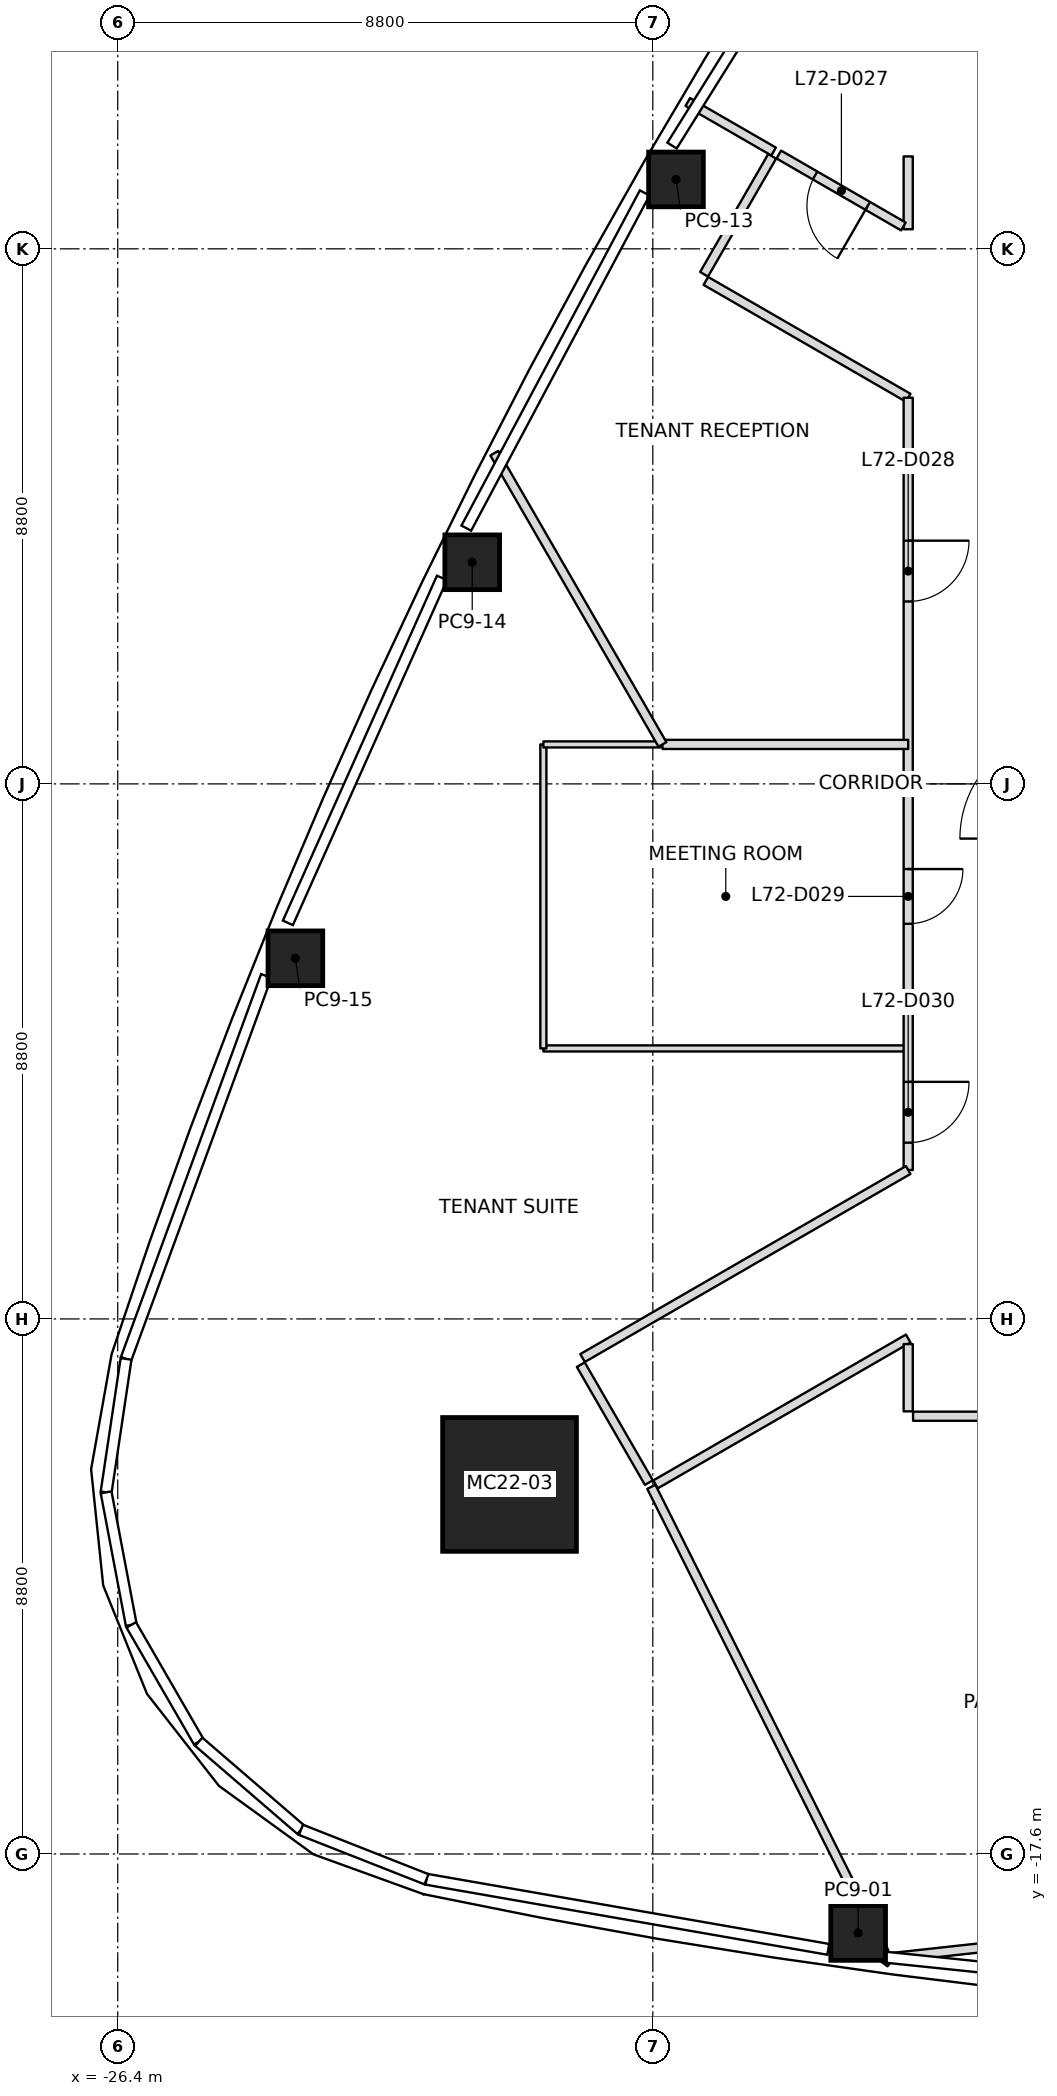
"""IFC4 building model, lengths in metres.
Left out: names, types, materials, properties, quantities, classifications, styles, units other than length and angle.
Written with IfcOpenShell. Run it as: python <this file> out.ifc"""

import sys

from ifc_helpers import new_model, si_unit, direction, frame, frame_2d, origin, origin_2d, place, context, subcontext, project, spatial, rectangle, extrude, clip, halfspace, element, fill, save


model = new_model("IFC4")
c1 = context("Model", 3, precision=1e-05, world=origin(), true_north=direction((0.0, 1.0)))
c2 = subcontext(c1, "Body", "Model", "MODEL_VIEW")
j1 = project(units=[si_unit("LENGTHUNIT", "METRE"), si_unit("PLANEANGLEUNIT", "RADIAN")], contexts=[c1])
p1 = place(None, origin())
s1 = spatial("IfcSite", under=j1, at=p1, CompositionType="ELEMENT")
p2 = place(p1, origin())
s2 = spatial("IfcBuilding", under=s1, at=p2, CompositionType="ELEMENT")
p3 = place(p2, frame((0.0, 0.0, 315.0)))
s3 = spatial("IfcBuildingStorey", under=s2, at=p3, CompositionType="ELEMENT", Elevation=315.0)
p4 = place(p3, frame((-19.957, -11.522, 0.0), z_axis=(0.027695790401, 0.015983033227, 0.999488612163), x_axis=(0.999616398022, -0.00044283261, -0.027692249912)))
e1 = element("IfcColumn", 1, at=p4, inside=s3, PredefinedType="COLUMN", context=c2, shape_type="SweptSolid", body=[
    clip(extrude(rectangle(XDim=2.2, YDim=2.2, at=origin_2d()), origin(), (0.0, 0.0, 1.0), 4.002), halfspace(frame((0.0, 0.0, 3.996)), False)),
])
p5 = place(p3, frame((-14.223, -18.899, 0.0), z_axis=(0.017391463473, 0.010312832726, 0.999795570344), x_axis=(-0.990322442734, 0.13788284729, 0.015804424743)))
e2 = element("IfcColumn", 2, at=p5, inside=s3, PredefinedType="COLUMN", context=c2, shape_type="SweptSolid", body=[
    clip(extrude(rectangle(XDim=0.9, YDim=0.9, at=origin_2d()), origin(), (0.0, 0.0, 1.0), 4.001), halfspace(frame((0.0, 0.0, 3.999)), False)),
])
p6 = place(p3, frame((-17.219, 9.941, 0.0), z_axis=(0.009887052741, -0.005675900648, 0.999935013058), x_axis=(0.49997556095, 0.866039512773, -2.7732311e-05)))
e3 = element("IfcColumn", 3, at=p6, inside=s3, PredefinedType="COLUMN", context=c2, shape_type="SweptSolid", body=[
    clip(extrude(rectangle(XDim=0.9, YDim=0.9, at=origin_2d()), origin(), (0.0, 0.0, 1.0), 4.0), halfspace(frame((0.0, 0.0, 3.999)), False)),
])
p7 = place(p3, frame((-20.57, 3.645, 0.0), z_axis=(0.014036676147, 0.001952928855, 0.999899573853), x_axis=(0.438991330539, 0.898456413276, -0.007917395706)))
e4 = element("IfcColumn", 4, at=p7, inside=s3, PredefinedType="COLUMN", context=c2, shape_type="SweptSolid", body=[
    clip(extrude(rectangle(XDim=0.9, YDim=0.9, at=origin_2d()), origin(), (0.0, 0.0, 1.0), 4.0), halfspace(frame((0.0, 0.0, 3.999)), False)),
])
p8 = place(p3, frame((-23.479, -2.868, 0.0), z_axis=(0.017696558482, 0.009885663704, 0.999794531627), x_axis=(0.375914723165, 0.926519298073, -0.015814904541)))
e5 = element("IfcColumn", 5, at=p8, inside=s3, PredefinedType="COLUMN", context=c2, shape_type="SweptSolid", body=[
    clip(extrude(rectangle(XDim=0.9, YDim=0.9, at=origin_2d()), origin(), (0.0, 0.0, 1.0), 4.001), halfspace(frame((0.0, 0.0, 3.999)), False)),
])
p9 = place(p3, frame((-13.4, 0.649, 0.0), z_axis=(0.0, 0.0, 1.0), x_axis=(-1.0, 0.0, 0.0)))
e6 = element("IfcWall", 6, at=p9, inside=s3, PredefinedType="PARTITIONING", context=c2, shape_type="SweptSolid", body=[
    extrude(rectangle(XDim=4.042, YDim=0.15, at=frame_2d((2.021, 0.0))), origin(), (0.0, 0.0, 1.0), 3.45),
])
p10 = place(p3, frame((-17.441, 0.649, 0.0), z_axis=(0.0, 0.0, 1.0), x_axis=(-0.499998843543, 0.866026071464, 0.0)))
e7 = element("IfcWall", 7, at=p10, inside=s3, PredefinedType="PARTITIONING", context=c2, shape_type="SweptSolid", body=[
    extrude(rectangle(XDim=5.531, YDim=0.15, at=frame_2d((2.765, 0.0))), origin(), (0.0, 0.0, 1.0), 3.234),
])
p11 = place(p3, frame((-17.625, -11.561, 0.0), z_axis=(0.0, 0.0, 1.0), x_axis=(0.447464657965, -0.894301615716, 0.0)))
e8 = element("IfcWall", 8, at=p11, inside=s3, PredefinedType="PARTITIONING", context=c2, shape_type="SweptSolid", body=[
    extrude(rectangle(XDim=8.557, YDim=0.15, at=frame_2d((4.278, 0.0))), origin(), (0.0, 0.0, 1.0), 3.45),
])
p12 = place(p3, frame((-15.613, 10.4, 0.0), z_axis=(0.0, 0.0, 1.0), x_axis=(-0.865976063253, 0.500085450571, 0.0)))
e9 = element("IfcWall", 9, at=p12, inside=s3, PredefinedType="PARTITIONING", context=c2, shape_type="SweptSolid", body=[
    extrude(rectangle(XDim=1.63, YDim=0.15, at=frame_2d((0.815, 0.0))), origin(), (0.0, 0.0, 1.0), 3.234),
])
p13 = place(p3, frame((-8.2, -18.703, 0.0), z_axis=(0.0, 0.0, 1.0), x_axis=(-0.994036039738, -0.109052059594, 0.0)))
e10 = element("IfcWall", 10, at=p13, inside=s3, PredefinedType="PARTITIONING", context=c2, shape_type="SweptSolid", body=[
    extrude(rectangle(XDim=5.478, YDim=0.15, at=frame_2d((2.739, 0.0))), origin(), (0.0, 0.0, 1.0), 3.234),
])
p14 = place(p3, frame((-13.696, -19.387, 0.0), z_axis=(0.0, 0.0, 1.0), x_axis=(-0.806193122495, 0.591652473368, 0.0)))
e11 = element("IfcWall", 11, at=p14, inside=s3, PredefinedType="PARTITIONING", context=c2, shape_type="SweptSolid", body=[
    extrude(rectangle(XDim=0.183, YDim=0.15, at=frame_2d((0.092, 0.0))), origin(), (0.0, 0.0, 1.0), 3.45),
])
p15 = place(p3, frame((-18.784, -9.552, 0.0), z_axis=(0.0, 0.0, 1.0), x_axis=(0.49994888933, -0.866054910533, 0.0)))
e12 = element("IfcWall", 12, at=p15, inside=s3, PredefinedType="PARTITIONING", context=c2, shape_type="SweptSolid", body=[
    extrude(rectangle(XDim=2.24, YDim=0.15, at=frame_2d((1.12, 0.0))), origin(), (0.0, 0.0, 1.0), 3.233),
])
p16 = place(p3, frame((-16.728, 8.272, 0.0), z_axis=(0.0, 0.0, 1.0), x_axis=(0.866021594059, -0.50000659858, 0.0)))
e13 = element("IfcWall", 13, at=p16, inside=s3, PredefinedType="PARTITIONING", context=c2, shape_type="SweptSolid", body=[
    extrude(rectangle(XDim=3.843, YDim=0.15, at=frame_2d((1.921, 0.0))), origin(), (0.0, 0.0, 1.0), 3.45),
])
p17 = place(p3, frame((-13.4, 6.351, 0.0), z_axis=(0.0, 0.0, 1.0), x_axis=(0.0, -1.0, 0.0)))
e14 = element("IfcWall", 14, at=p17, inside=s3, PredefinedType="PARTITIONING", context=c2, shape_type="SweptSolid", body=[
    extrude(rectangle(XDim=12.702, YDim=0.15, at=frame_2d((6.351, 0.0))), origin(), (0.0, 0.0, 1.0), 3.317),
])
p18 = place(p17, frame((2.351, 0.0, 0.0)))
e15 = element("IfcOpeningElement", 15, at=p18, cuts=e14, PredefinedType="OPENING", context=c2, shape_type="SweptSolid", body=[
    extrude(rectangle(XDim=1.0, YDim=2.1, at=frame_2d((0.5, 1.05))), frame((0.0, 0.075, 0.0), z_axis=(0.0, -1.0, 0.0), x_axis=(1.0, 0.0, 0.0)), (0.0, 0.0, 1.0), 0.15),
])
p19 = place(p17, frame((7.752, 0.0, 0.0)))
e16 = element("IfcOpeningElement", 16, at=p19, cuts=e14, PredefinedType="OPENING", context=c2, shape_type="SweptSolid", body=[
    extrude(rectangle(XDim=0.9, YDim=2.1, at=frame_2d((0.45, 1.05))), frame((0.0, 0.075, 0.0), z_axis=(0.0, -1.0, 0.0), x_axis=(1.0, 0.0, 0.0)), (0.0, 0.0, 1.0), 0.15),
])
p20 = place(p17, frame((11.252, 0.0, 0.0)))
e17 = element("IfcOpeningElement", 17, at=p20, cuts=e14, PredefinedType="OPENING", context=c2, shape_type="SweptSolid", body=[
    extrude(rectangle(XDim=1.0, YDim=2.1, at=frame_2d((0.5, 1.05))), frame((0.0, 0.075, 0.0), z_axis=(0.0, -1.0, 0.0), x_axis=(1.0, 0.0, 0.0)), (0.0, 0.0, 1.0), 0.15),
])
p21 = place(p3, frame((-13.4, -6.351, 0.0), z_axis=(0.0, 0.0, 1.0), x_axis=(-0.866038319186, -0.499977629202, 0.0)))
e18 = element("IfcWall", 18, at=p21, inside=s3, PredefinedType="PARTITIONING", context=c2, shape_type="SweptSolid", body=[
    extrude(rectangle(XDim=6.184, YDim=0.15, at=frame_2d((3.092, 0.0))), origin(), (0.0, 0.0, 1.0), 3.317),
])
p22 = place(p3, frame((-17.555, -11.521, 0.0), z_axis=(0.0, 0.0, 1.0), x_axis=(0.866027142779, 0.499996987961, 0.0)))
e19 = element("IfcWall", 19, at=p22, inside=s3, PredefinedType="PARTITIONING", context=c2, shape_type="SweptSolid", body=[
    extrude(rectangle(XDim=4.798, YDim=0.15, at=frame_2d((2.399, 0.0))), origin(), (0.0, 0.0, 1.0), 3.233),
])
p23 = place(p3, frame((-13.4, -9.214, 0.0), z_axis=(0.0, 0.0, 1.0), x_axis=(0.0, -1.0, 0.0)))
e20 = element("IfcWall", 20, at=p23, inside=s3, PredefinedType="PARTITIONING", context=c2, shape_type="SweptSolid", body=[
    extrude(rectangle(XDim=1.106, YDim=0.15, at=frame_2d((0.553, 0.0))), origin(), (0.0, 0.0, 1.0), 3.233),
])
p24 = place(p3, frame((-15.637, 10.321, 0.0), z_axis=(0.0, 0.0, 1.0), x_axis=(-0.49999608499, -0.866027664105, 0.0)))
e21 = element("IfcWall", 21, at=p24, inside=s3, PredefinedType="PARTITIONING", context=c2, shape_type="SweptSolid", body=[
    extrude(rectangle(XDim=2.24, YDim=0.15, at=frame_2d((1.12, 0.0))), origin(), (0.0, 0.0, 1.0), 3.45),
])
p25 = place(p3, frame((-13.4, 10.32, 0.0), z_axis=(0.0, 0.0, 1.0), x_axis=(0.0, -1.0, 0.0)))
e22 = element("IfcWall", 22, at=p25, inside=s3, PredefinedType="PARTITIONING", context=c2, shape_type="SweptSolid", body=[
    extrude(rectangle(XDim=1.198, YDim=0.15, at=frame_2d((0.599, 0.0))), origin(), (0.0, 0.0, 1.0), 3.45),
])
p26 = place(p3, frame((-13.479, 9.168, 0.0), z_axis=(0.0, 0.0, 1.0), x_axis=(-0.866049809446, 0.499957725772, 0.0)))
e23 = element("IfcWall", 23, at=p26, inside=s3, PredefinedType="PARTITIONING", context=c2, shape_type="SweptSolid", body=[
    extrude(rectangle(XDim=2.365, YDim=0.15, at=frame_2d((1.183, 0.0))), origin(), (0.0, 0.0, 1.0), 3.45),
])
p27 = place(p26, frame((0.677, 0.0, 0.0)))
e24 = element("IfcOpeningElement", 24, at=p27, cuts=e23, PredefinedType="OPENING", context=c2, shape_type="SweptSolid", body=[
    extrude(rectangle(XDim=1.0, YDim=2.1, at=frame_2d((0.5, 1.05))), frame((0.0, 0.075, 0.0), z_axis=(0.0, -1.0, 0.0), x_axis=(1.0, 0.0, 0.0)), (0.0, 0.0, 1.0), 0.15),
])
p28 = place(p3, frame((-13.32, -10.4, 0.0), z_axis=(0.0, 0.0, 1.0), x_axis=(1.0, 0.0, 0.0)))
e25 = element("IfcWall", 25, at=p28, inside=s3, PredefinedType="PARTITIONING", context=c2, shape_type="SweptSolid", body=[
    extrude(rectangle(XDim=12.12, YDim=0.15, at=frame_2d((6.06, 0.0))), origin(), (0.0, 0.0, 1.0), 3.393),
])
p29 = place(p28, frame((2.02, 0.0, 0.0)))
e26 = element("IfcOpeningElement", 26, at=p29, cuts=e25, PredefinedType="OPENING", context=c2, shape_type="SweptSolid", body=[
    extrude(rectangle(XDim=1.0, YDim=2.1, at=frame_2d((0.5, 1.05))), frame((0.0, 0.075, 0.0), z_axis=(0.0, -1.0, 0.0), x_axis=(1.0, 0.0, 0.0)), (0.0, 0.0, 1.0), 0.15),
])
p30 = place(p3, frame((-13.43, -4.351, 0.0), z_axis=(0.0, 0.0, 1.0), x_axis=(-1.0, 0.0, 0.0)))
e27 = element("IfcWall", 27, at=p30, inside=s3, PredefinedType="PARTITIONING", context=c2, shape_type="SweptSolid", body=[
    extrude(rectangle(XDim=5.97, YDim=0.1, at=frame_2d((2.985, 0.0))), origin(), (0.0, 0.0, 1.0), 3.317),
])
p31 = place(p3, frame((-19.4, -4.351, 0.0), z_axis=(0.0, 0.0, 1.0), x_axis=(0.0, 1.0, 0.0)))
e28 = element("IfcWall", 28, at=p31, inside=s3, PredefinedType="PARTITIONING", context=c2, shape_type="SweptSolid", body=[
    extrude(rectangle(XDim=5.0, YDim=0.1, at=frame_2d((2.5, 0.0))), origin(), (0.0, 0.0, 1.0), 3.317),
])
p32 = place(p3, frame((-19.4, 0.649, 0.0), z_axis=(0.0, 0.0, 1.0), x_axis=(1.0, 0.0, 0.0)))
e29 = element("IfcWall", 29, at=p32, inside=s3, PredefinedType="PARTITIONING", context=c2, shape_type="SweptSolid", body=[
    extrude(rectangle(XDim=1.924, YDim=0.1, at=frame_2d((0.962, 0.0))), origin(), (0.0, 0.0, 1.0), 3.393),
])
p33 = place(p27, origin())
e30 = element("IfcDoor", 30, at=p33, inside=s3, OperationType="SINGLE_SWING_LEFT", PredefinedType="DOOR", context=c2, shape_type="SweptSolid", body=[
    extrude(rectangle(XDim=1.0, YDim=2.1, at=frame_2d((0.5, 1.05))), frame((0.0, 0.025, 0.0), z_axis=(0.0, -1.0, 0.0), x_axis=(1.0, 0.0, 0.0)), (0.0, 0.0, 1.0), 0.05),
])
fill(e24, e30)
p34 = place(p18, origin())
e31 = element("IfcDoor", 31, at=p34, inside=s3, OperationType="SINGLE_SWING_LEFT", PredefinedType="DOOR", context=c2, shape_type="SweptSolid", body=[
    extrude(rectangle(XDim=1.0, YDim=2.1, at=frame_2d((0.5, 1.05))), frame((0.0, 0.025, 0.0), z_axis=(0.0, -1.0, 0.0), x_axis=(1.0, 0.0, 0.0)), (0.0, 0.0, 1.0), 0.05),
])
fill(e15, e31)
p35 = place(p19, origin())
e32 = element("IfcDoor", 32, at=p35, inside=s3, OperationType="SINGLE_SWING_RIGHT", PredefinedType="DOOR", context=c2, shape_type="SweptSolid", body=[
    extrude(rectangle(XDim=0.9, YDim=2.1, at=frame_2d((0.45, 1.05))), frame((0.0, 0.025, 0.0), z_axis=(0.0, -1.0, 0.0), x_axis=(1.0, 0.0, 0.0)), (0.0, 0.0, 1.0), 0.05),
])
fill(e16, e32)
p36 = place(p20, origin())
e33 = element("IfcDoor", 33, at=p36, inside=s3, OperationType="SINGLE_SWING_RIGHT", PredefinedType="DOOR", context=c2, shape_type="SweptSolid", body=[
    extrude(rectangle(XDim=1.0, YDim=2.1, at=frame_2d((0.5, 1.05))), frame((0.0, 0.025, 0.0), z_axis=(0.0, -1.0, 0.0), x_axis=(1.0, 0.0, 0.0)), (0.0, 0.0, 1.0), 0.05),
])
fill(e17, e33)
save(model, sys.argv[1])
